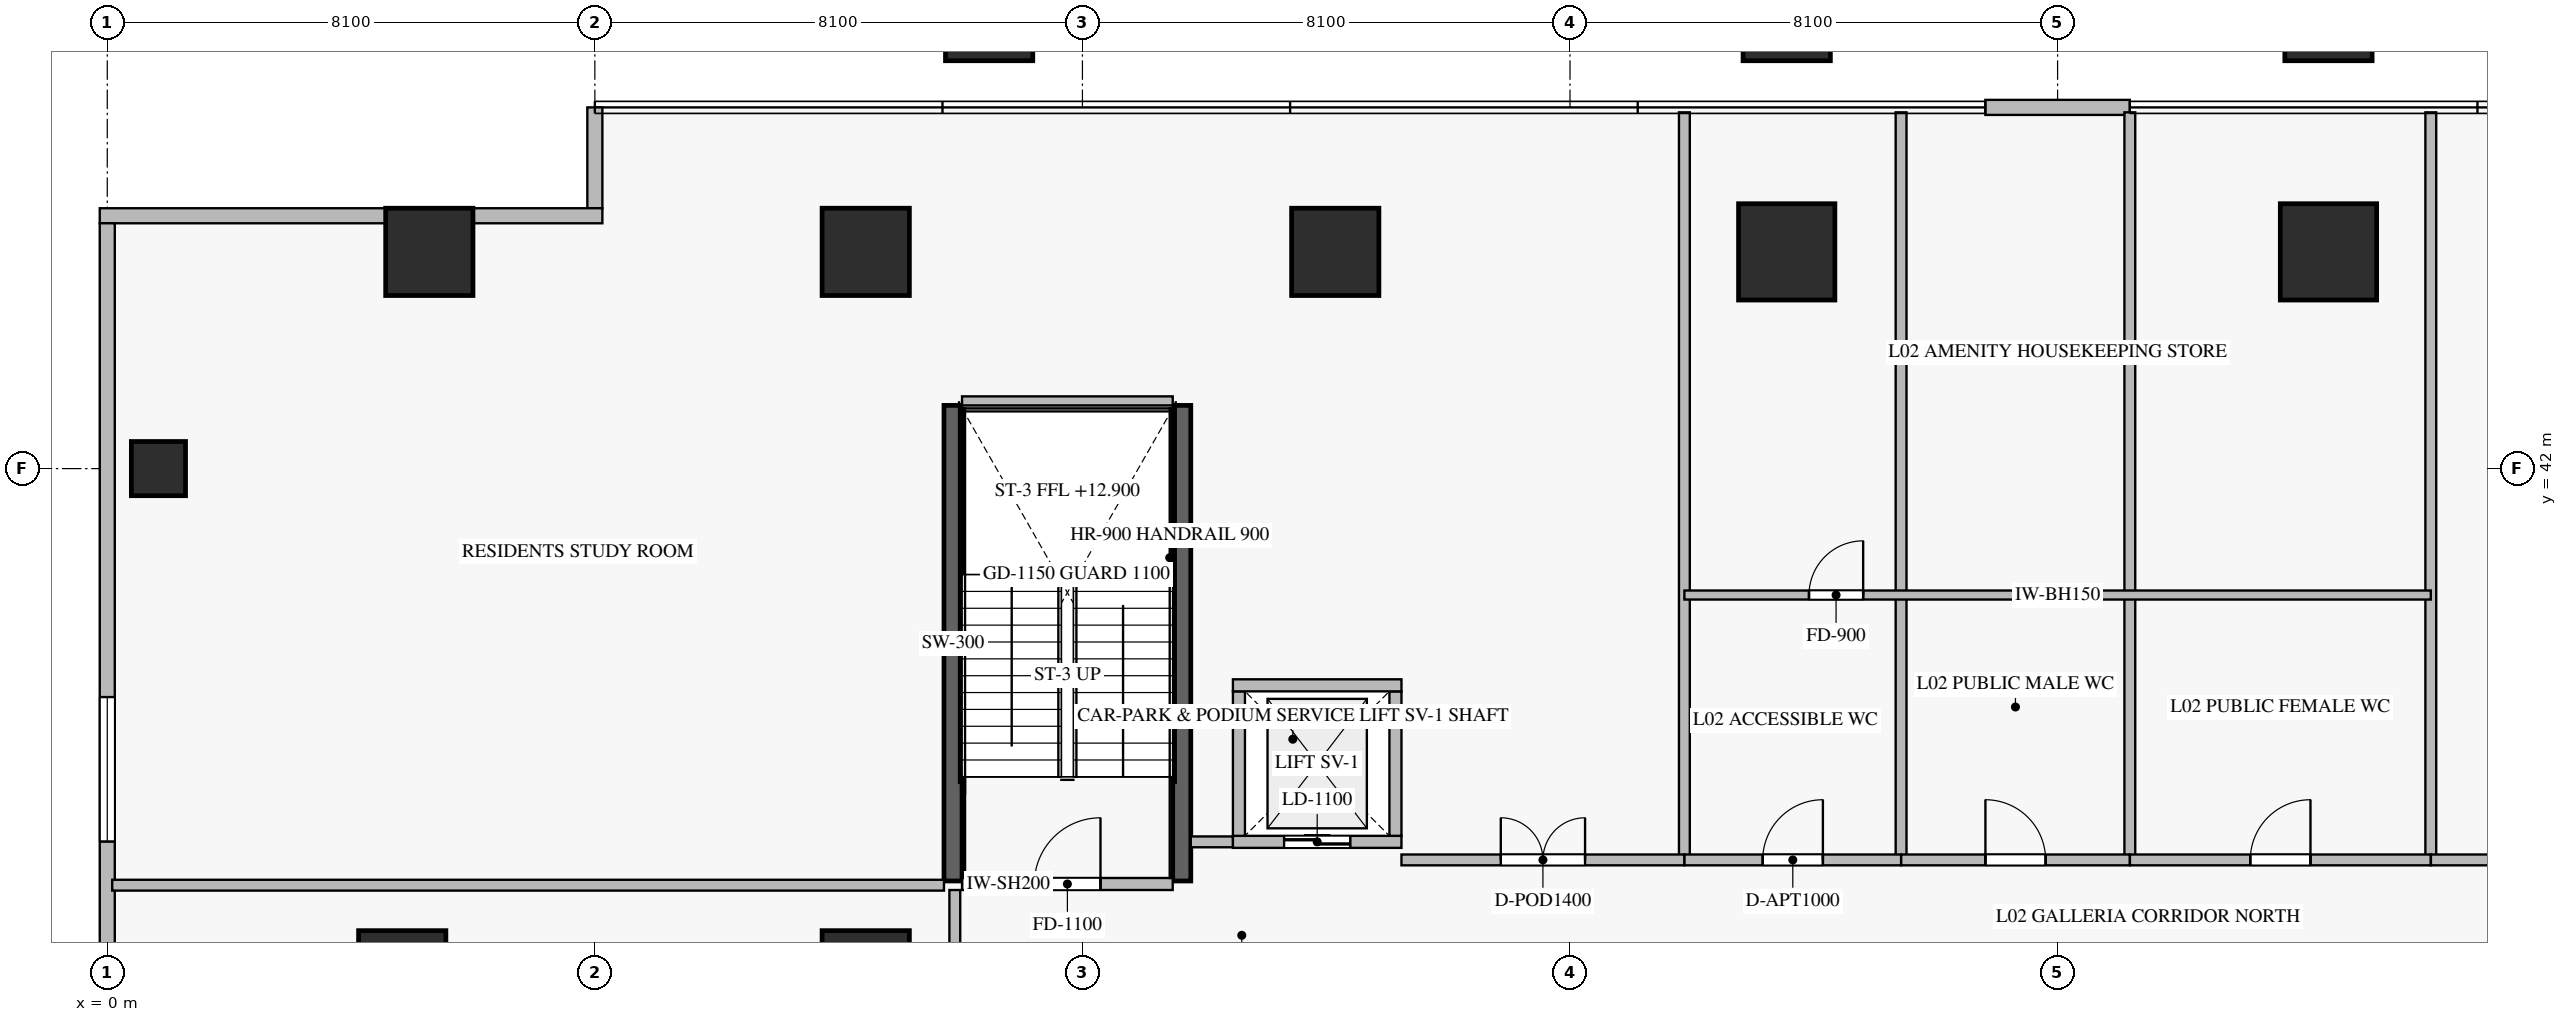
"""IFC4 building model, lengths in metres.
Left out: names, types, materials, properties, quantities, classifications, styles, units other than length and angle.
Written with IfcOpenShell. Run it as: python <this file> out.ifc"""

import sys

from ifc_helpers import new_model, si_unit, direction, frame, frame_2d, origin, origin_2d, place, context, subcontext, project, spatial, rectangle, extrude, source, transform, mapped, element, fill, save


model = new_model("IFC4")
c1 = context("Model", 3, precision=1e-05, world=origin(), true_north=direction((0.0, 1.0)))
c2 = subcontext(c1, "Body", "Model", "MODEL_VIEW")
j1 = project(units=[si_unit("LENGTHUNIT", "METRE"), si_unit("PLANEANGLEUNIT", "RADIAN")], contexts=[c1])
p1 = place(None, origin())
s1 = spatial("IfcSite", under=j1, at=p1, CompositionType="ELEMENT")
p2 = place(p1, origin())
s2 = spatial("IfcBuilding", under=s1, at=p2, CompositionType="ELEMENT")
p3 = place(p2, frame((0.0, 0.0, 10.5)))
s3 = spatial("IfcBuildingStorey", under=s2, at=p3, CompositionType="ELEMENT", Elevation=10.5)
m1 = source(origin(), c2, "Body", "SweptSolid", [
    extrude(rectangle(XDim=0.9, YDim=0.9, at=origin_2d()), origin(), (0.0, 0.0, 1.0), 4.8),
])
p4 = place(p3, frame((0.85, 42.0, -0.38), z_axis=(0.0, 0.0, 1.0), x_axis=(1.0, 0.0, 0.0)))
e1 = element("IfcColumn", 1, at=p4, inside=s3, PredefinedType="COLUMN", context=c2, shape_type="MappedRepresentation", body=[
    mapped(m1, transform((0.0, 0.0, 0.0), scale=1.0)),
])
m2 = source(origin(), c2, "Body", "SweptSolid", [
    extrude(rectangle(XDim=1.45, YDim=1.45, at=origin_2d()), origin(), (0.0, 0.0, 1.0), 4.8),
])
for number, where, z_axis, x_axis in (
    (2, (12.6, 45.6, -0.38), (0.0, 0.0, 1.0), (1.0, 0.0, 0.0)),
    (3, (20.4, 45.6, -0.38), (0.0, 0.0, 1.0), (1.0, 0.0, 0.0)),
):
    element("IfcColumn", number, at=place(p3, frame(where, z_axis=z_axis, x_axis=x_axis)), inside=s3, PredefinedType="COLUMN", context=c2, shape_type="MappedRepresentation", body=[
        mapped(m2, transform((0.0, 0.0, 0.0), scale=1.0)),
    ])
m3 = source(origin(), c2, "Body", "SweptSolid", [
    extrude(rectangle(XDim=1.6, YDim=1.6, at=origin_2d()), origin(), (0.0, 0.0, 1.0), 4.8),
])
for number, where, z_axis, x_axis in (
    (4, (27.9, 45.6, -0.38), (0.0, 0.0, 1.0), (1.0, 0.0, 0.0)),
    (5, (36.9, 45.6, -0.38), (0.0, 0.0, 1.0), (1.0, 0.0, 0.0)),
):
    element("IfcColumn", number, at=place(p3, frame(where, z_axis=z_axis, x_axis=x_axis)), inside=s3, PredefinedType="COLUMN", context=c2, shape_type="MappedRepresentation", body=[
        mapped(m3, transform((0.0, 0.0, 0.0), scale=1.0)),
    ])
for number, where, z_axis, x_axis in (
    (6, (12.6, 33.6, -0.38), (0.0, 0.0, 1.0), (1.0, 0.0, 0.0)),
    (7, (14.65, 49.5, -0.38), (0.0, 0.0, 1.0), (1.0, 0.0, 0.0)),
    (8, (27.9, 49.5, -0.38), (0.0, 0.0, 1.0), (1.0, 0.0, 0.0)),
    (9, (36.9, 49.5, -0.38), (0.0, 0.0, 1.0), (1.0, 0.0, 0.0)),
    (10, (4.9, 33.6, -0.38), (0.0, 0.0, 1.0), (1.0, 0.0, 0.0)),
    (11, (5.35, 45.6, -0.38), (0.0, 0.0, 1.0), (1.0, 0.0, 0.0)),
):
    element("IfcColumn", number, at=place(p3, frame(where, z_axis=z_axis, x_axis=x_axis)), inside=s3, PredefinedType="COLUMN", context=c2, shape_type="MappedRepresentation", body=[
        mapped(m2, transform((0.0, 0.0, 0.0), scale=1.0)),
    ])
p5 = place(p3, frame((33.6, 48.0, 0.0), z_axis=(0.0, 0.0, 1.0), x_axis=(-1.0, 0.0, 0.0)))
e12 = element("IfcWall", 12, at=p5, inside=s3, PredefinedType="ELEMENTEDWALL", context=c2, shape_type="SweptSolid", body=[
    extrude(rectangle(XDim=2.4, YDim=0.25, at=frame_2d((1.2, 0.0))), origin(), (0.0, 0.0, 1.0), 4.405),
])
p6 = place(p3, frame((8.1, 48.0, 0.0), z_axis=(0.0, 0.0, 1.0), x_axis=(0.0, -1.0, 0.0)))
e13 = element("IfcWall", 13, at=p6, inside=s3, PredefinedType="ELEMENTEDWALL", context=c2, shape_type="SweptSolid", body=[
    extrude(rectangle(XDim=1.675, YDim=0.25, at=frame_2d((0.837, 0.0))), origin(), (0.0, 0.0, 1.0), 4.405),
])
p7 = place(p3, frame((8.225, 46.2, 0.0), z_axis=(0.0, 0.0, 1.0), x_axis=(-1.0, 0.0, 0.0)))
e14 = element("IfcWall", 14, at=p7, inside=s3, PredefinedType="ELEMENTEDWALL", context=c2, shape_type="SweptSolid", body=[
    extrude(rectangle(XDim=8.35, YDim=0.25, at=frame_2d((4.175, 0.0))), origin(), (0.0, 0.0, 1.0), 4.405),
])
p8 = place(p3, frame((0.0, 46.075, 0.0), z_axis=(0.0, 0.0, 1.0), x_axis=(0.0, -1.0, 0.0)))
e15 = element("IfcWall", 15, at=p8, inside=s3, PredefinedType="ELEMENTEDWALL", context=c2, shape_type="SweptSolid", body=[
    extrude(rectangle(XDim=41.75, YDim=0.25, at=frame_2d((20.875, 0.0))), origin(), (0.0, 0.0, 1.0), 4.405),
])
p9 = place(p8, frame((7.87, 0.0, 0.6)))
e16 = element("IfcOpeningElement", 16, at=p9, cuts=e15, PredefinedType="OPENING", context=c2, shape_type="SweptSolid", body=[
    extrude(rectangle(XDim=2.4, YDim=2.6, at=frame_2d((1.2, 1.3))), frame((0.0, 0.135, 0.0), z_axis=(0.0, -1.0, 0.0), x_axis=(1.0, 0.0, 0.0)), (0.0, 0.0, 1.0), 0.27),
])
p10 = place(p8, frame((24.397, 0.0, 0.6)))
e17 = element("IfcOpeningElement", 17, at=p10, cuts=e15, PredefinedType="OPENING", context=c2, shape_type="SweptSolid", body=[
    extrude(rectangle(XDim=2.4, YDim=2.6, at=frame_2d((1.2, 1.3))), frame((0.0, 0.135, 0.0), z_axis=(0.0, -1.0, 0.0), x_axis=(1.0, 0.0, 0.0)), (0.0, 0.0, 1.0), 0.27),
])
for number, where, z_axis, x_axis in (
    (18, (14.05, 35.15, -0.38), (0.0, 0.0, 1.0), (0.0, 1.0, 0.0)),
    (19, (17.85, 35.15, -0.38), (0.0, 0.0, 1.0), (0.0, 1.0, 0.0)),
):
    element("IfcWall", number, at=place(p3, frame(where, z_axis=z_axis, x_axis=x_axis)), inside=s3, PredefinedType="SHEAR", context=c2, shape_type="SweptSolid", body=[
        extrude(rectangle(XDim=7.9, YDim=0.3, at=frame_2d((3.95, 0.0))), origin(), (0.0, 0.0, 1.0), 4.798),
    ])
p11 = place(p3, frame((14.2, 35.1, 0.0), z_axis=(0.0, 0.0, 1.0), x_axis=(1.0, 0.0, 0.0)))
e20 = element("IfcWall", 20, at=p11, inside=s3, PredefinedType="STANDARD", context=c2, shape_type="SweptSolid", body=[
    extrude(rectangle(XDim=3.5, YDim=0.2, at=frame_2d((1.75, 0.0))), origin(), (0.0, 0.0, 1.0), 4.42),
])
p12 = place(p11, frame((1.2, 0.0, 0.0)))
e21 = element("IfcOpeningElement", 21, at=p12, cuts=e20, PredefinedType="OPENING", context=c2, shape_type="SweptSolid", body=[
    extrude(rectangle(XDim=1.1, YDim=2.15, at=frame_2d((0.55, 1.075))), frame((0.0, 0.11, 0.0), z_axis=(0.0, -1.0, 0.0), x_axis=(1.0, 0.0, 0.0)), (0.0, 0.0, 1.0), 0.22),
])
p13 = place(p3, frame((14.2, 43.1, 0.0), z_axis=(0.0, 0.0, 1.0), x_axis=(1.0, 0.0, 0.0)))
e22 = element("IfcWall", 22, at=p13, inside=s3, PredefinedType="STANDARD", context=c2, shape_type="SweptSolid", body=[
    extrude(rectangle(XDim=3.5, YDim=0.2, at=frame_2d((1.75, 0.0))), origin(), (0.0, 0.0, 1.0), 1.885),
])
p14 = place(p3, frame((18.7, 35.8, 0.0), z_axis=(0.0, 0.0, 1.0), x_axis=(1.0, 0.0, 0.0)))
e23 = element("IfcWall", 23, at=p14, inside=s3, PredefinedType="STANDARD", context=c2, shape_type="SweptSolid", body=[
    extrude(rectangle(XDim=2.8, YDim=0.2, at=frame_2d((1.4, 0.0))), origin(), (0.0, 0.0, 1.0), 4.42),
])
p15 = place(p14, frame((0.85, 0.0, 0.0)))
e24 = element("IfcOpeningElement", 24, at=p15, cuts=e23, PredefinedType="OPENING", context=c2, shape_type="SweptSolid", body=[
    extrude(rectangle(XDim=1.1, YDim=2.2, at=frame_2d((0.55, 1.1))), frame((0.0, 0.11, 0.0), z_axis=(0.0, -1.0, 0.0), x_axis=(1.0, 0.0, 0.0)), (0.0, 0.0, 1.0), 0.22),
])
for number, where, z_axis, x_axis in (
    (25, (18.8, 35.9, 0.0), (0.0, 0.0, 1.0), (0.0, 1.0, 0.0)),
    (26, (21.4, 35.9, 0.0), (0.0, 0.0, 1.0), (0.0, 1.0, 0.0)),
):
    element("IfcWall", number, at=place(p3, frame(where, z_axis=z_axis, x_axis=x_axis)), inside=s3, PredefinedType="STANDARD", context=c2, shape_type="SweptSolid", body=[
        extrude(rectangle(XDim=2.4, YDim=0.2, at=frame_2d((1.2, 0.0))), origin(), (0.0, 0.0, 1.0), 4.42),
    ])
p16 = place(p3, frame((18.7, 38.4, 0.0), z_axis=(0.0, 0.0, 1.0), x_axis=(1.0, 0.0, 0.0)))
e27 = element("IfcWall", 27, at=p16, inside=s3, PredefinedType="STANDARD", context=c2, shape_type="SweptSolid", body=[
    extrude(rectangle(XDim=2.8, YDim=0.2, at=frame_2d((1.4, 0.0))), origin(), (0.0, 0.0, 1.0), 4.42),
])
p17 = place(p3, frame((0.082, 35.08, 0.0), z_axis=(0.0, 0.0, 1.0), x_axis=(1.0, 0.0, 0.0)))
e28 = element("IfcWall", 28, at=p17, inside=s3, PredefinedType="PARTITIONING", context=c2, shape_type="SweptSolid", body=[
    extrude(rectangle(XDim=13.818, YDim=0.18, at=frame_2d((6.909, 0.0))), origin(), (0.0, 0.0, 1.0), 4.42),
])
p18 = place(p3, frame((18.0, 35.8, 0.0), z_axis=(0.0, 0.0, 1.0), x_axis=(1.0, 0.0, 0.0)))
e29 = element("IfcWall", 29, at=p18, inside=s3, PredefinedType="PARTITIONING", context=c2, shape_type="SweptSolid", body=[
    extrude(rectangle(XDim=0.698, YDim=0.18, at=frame_2d((0.349, 0.0))), origin(), (0.0, 0.0, 1.0), 4.42),
])
p19 = place(p3, frame((14.08, 33.08, 0.0), z_axis=(0.0, 0.0, 1.0), x_axis=(0.0, 1.0, 0.0)))
e30 = element("IfcWall", 30, at=p19, inside=s3, PredefinedType="PARTITIONING", context=c2, shape_type="SweptSolid", body=[
    extrude(rectangle(XDim=1.92, YDim=0.18, at=frame_2d((0.96, 0.0))), origin(), (0.0, 0.0, 1.0), 4.42),
])
for number, where, z_axis, x_axis in (
    (31, (26.2, 35.5, 0.0), (0.0, 0.0, 1.0), (0.0, 1.0, 0.0)),
    (32, (29.8, 35.5, 0.0), (0.0, 0.0, 1.0), (0.0, 1.0, 0.0)),
    (33, (33.6, 35.5, 0.0), (0.0, 0.0, 1.0), (0.0, 1.0, 0.0)),
    (34, (38.6, 35.5, 0.0), (0.0, 0.0, 1.0), (0.0, 1.0, 0.0)),
):
    element("IfcWall", number, at=place(p3, frame(where, z_axis=z_axis, x_axis=x_axis)), inside=s3, PredefinedType="PARTITIONING", context=c2, shape_type="SweptSolid", body=[
        extrude(rectangle(XDim=12.418, YDim=0.18, at=frame_2d((6.209, 0.0))), origin(), (0.0, 0.0, 1.0), 4.42),
    ])
p20 = place(p3, frame((21.5, 35.5, 0.0), z_axis=(0.0, 0.0, 1.0), x_axis=(1.0, 0.0, 0.0)))
e35 = element("IfcWall", 35, at=p20, inside=s3, PredefinedType="PARTITIONING", context=c2, shape_type="SweptSolid", body=[
    extrude(rectangle(XDim=4.7, YDim=0.18, at=frame_2d((2.35, 0.0))), origin(), (0.0, 0.0, 1.0), 4.42),
])
p21 = place(p20, frame((1.65, 0.0, 0.0)))
e36 = element("IfcOpeningElement", 36, at=p21, cuts=e35, PredefinedType="OPENING", context=c2, shape_type="SweptSolid", body=[
    extrude(rectangle(XDim=1.4, YDim=2.25, at=frame_2d((0.7, 1.125))), frame((0.0, 0.1, 0.0), z_axis=(0.0, -1.0, 0.0), x_axis=(1.0, 0.0, 0.0)), (0.0, 0.0, 1.0), 0.2),
])
p22 = place(p3, frame((26.202, 35.5, 0.0), z_axis=(0.0, 0.0, 1.0), x_axis=(1.0, 0.0, 0.0)))
e37 = element("IfcWall", 37, at=p22, inside=s3, PredefinedType="PARTITIONING", context=c2, shape_type="SweptSolid", body=[
    extrude(rectangle(XDim=3.598, YDim=0.18, at=frame_2d((1.799, 0.0))), origin(), (0.0, 0.0, 1.0), 4.42),
])
p23 = place(p22, frame((1.299, 0.0, 0.0)))
e38 = element("IfcOpeningElement", 38, at=p23, cuts=e37, PredefinedType="OPENING", context=c2, shape_type="SweptSolid", body=[
    extrude(rectangle(XDim=1.0, YDim=2.15, at=frame_2d((0.5, 1.075))), frame((0.0, 0.1, 0.0), z_axis=(0.0, -1.0, 0.0), x_axis=(1.0, 0.0, 0.0)), (0.0, 0.0, 1.0), 0.2),
])
p24 = place(p3, frame((29.802, 35.5, 0.0), z_axis=(0.0, 0.0, 1.0), x_axis=(1.0, 0.0, 0.0)))
e39 = element("IfcWall", 39, at=p24, inside=s3, PredefinedType="PARTITIONING", context=c2, shape_type="SweptSolid", body=[
    extrude(rectangle(XDim=3.798, YDim=0.18, at=frame_2d((1.899, 0.0))), origin(), (0.0, 0.0, 1.0), 4.42),
])
p25 = place(p24, frame((1.399, 0.0, 0.0)))
e40 = element("IfcOpeningElement", 40, at=p25, cuts=e39, PredefinedType="OPENING", context=c2, shape_type="SweptSolid", body=[
    extrude(rectangle(XDim=1.0, YDim=2.15, at=frame_2d((0.5, 1.075))), frame((0.0, 0.1, 0.0), z_axis=(0.0, -1.0, 0.0), x_axis=(1.0, 0.0, 0.0)), (0.0, 0.0, 1.0), 0.2),
])
p26 = place(p3, frame((33.602, 35.5, 0.0), z_axis=(0.0, 0.0, 1.0), x_axis=(1.0, 0.0, 0.0)))
e41 = element("IfcWall", 41, at=p26, inside=s3, PredefinedType="PARTITIONING", context=c2, shape_type="SweptSolid", body=[
    extrude(rectangle(XDim=4.998, YDim=0.18, at=frame_2d((2.499, 0.0))), origin(), (0.0, 0.0, 1.0), 4.42),
])
p27 = place(p26, frame((1.999, 0.0, 0.0)))
e42 = element("IfcOpeningElement", 42, at=p27, cuts=e41, PredefinedType="OPENING", context=c2, shape_type="SweptSolid", body=[
    extrude(rectangle(XDim=1.0, YDim=2.15, at=frame_2d((0.5, 1.075))), frame((0.0, 0.1, 0.0), z_axis=(0.0, -1.0, 0.0), x_axis=(1.0, 0.0, 0.0)), (0.0, 0.0, 1.0), 0.2),
])
p28 = place(p3, frame((38.602, 35.5, 0.0), z_axis=(0.0, 0.0, 1.0), x_axis=(1.0, 0.0, 0.0)))
e43 = element("IfcWall", 43, at=p28, inside=s3, PredefinedType="PARTITIONING", context=c2, shape_type="SweptSolid", body=[
    extrude(rectangle(XDim=4.698, YDim=0.18, at=frame_2d((2.349, 0.0))), origin(), (0.0, 0.0, 1.0), 4.42),
])
p29 = place(p28, frame((1.649, 0.0, 0.0)))
e44 = element("IfcOpeningElement", 44, at=p29, cuts=e43, PredefinedType="OPENING", context=c2, shape_type="SweptSolid", body=[
    extrude(rectangle(XDim=1.4, YDim=2.25, at=frame_2d((0.7, 1.125))), frame((0.0, 0.1, 0.0), z_axis=(0.0, -1.0, 0.0), x_axis=(1.0, 0.0, 0.0)), (0.0, 0.0, 1.0), 0.2),
])
p30 = place(p3, frame((26.2, 39.9, 0.0), z_axis=(0.0, 0.0, 1.0), x_axis=(1.0, 0.0, 0.0)))
e45 = element("IfcWall", 45, at=p30, inside=s3, PredefinedType="PARTITIONING", context=c2, shape_type="SweptSolid", body=[
    extrude(rectangle(XDim=12.4, YDim=0.15, at=frame_2d((6.2, 0.0))), origin(), (0.0, 0.0, 1.0), 4.42),
])
p31 = place(p30, frame((2.07, 0.0, 0.0)))
e46 = element("IfcOpeningElement", 46, at=p31, cuts=e45, PredefinedType="OPENING", context=c2, shape_type="SweptSolid", body=[
    extrude(rectangle(XDim=0.9, YDim=2.1, at=frame_2d((0.45, 1.05))), frame((0.0, 0.085, 0.0), z_axis=(0.0, -1.0, 0.0), x_axis=(1.0, 0.0, 0.0)), (0.0, 0.0, 1.0), 0.17),
])
m4 = source(origin(), c2, "Body", "SweptSolid", [
    extrude(rectangle(XDim=2.4, YDim=2.6, at=frame_2d((1.2, 1.3))), frame((0.0, 0.03, 0.0), z_axis=(0.0, -1.0, 0.0), x_axis=(1.0, 0.0, 0.0)), (0.0, 0.0, 1.0), 0.06),
])
p32 = place(p9, origin())
e47 = element("IfcWindow", 47, at=p32, inside=s3, PartitioningType="SINGLE_PANEL", PredefinedType="WINDOW", context=c2, shape_type="MappedRepresentation", body=[
    mapped(m4, transform((0.0, 0.0, 0.0), scale=1.0)),
])
fill(e16, e47)
m5 = source(origin(), c2, "Body", "SweptSolid", [
    extrude(rectangle(XDim=1.1, YDim=2.15, at=frame_2d((0.55, 1.075))), frame((0.0, 0.025, 0.0), z_axis=(0.0, -1.0, 0.0), x_axis=(1.0, 0.0, 0.0)), (0.0, 0.0, 1.0), 0.05),
])
p33 = place(p12, origin())
e48 = element("IfcDoor", 48, at=p33, inside=s3, OperationType="SINGLE_SWING_RIGHT", PredefinedType="DOOR", context=c2, shape_type="MappedRepresentation", body=[
    mapped(m5, transform((0.0, 0.0, 0.0), scale=1.0)),
])
fill(e21, e48)
m6 = source(origin(), c2, "Body", "SweptSolid", [
    extrude(rectangle(XDim=1.1, YDim=2.2, at=frame_2d((0.55, 1.1))), frame((0.0, 0.025, 0.0), z_axis=(0.0, -1.0, 0.0), x_axis=(1.0, 0.0, 0.0)), (0.0, 0.0, 1.0), 0.05),
])
p34 = place(p15, origin())
e49 = element("IfcDoor", 49, at=p34, inside=s3, OperationType="DOUBLE_DOOR_SLIDING", PredefinedType="DOOR", context=c2, shape_type="MappedRepresentation", body=[
    mapped(m6, transform((0.0, 0.0, 0.0), scale=1.0)),
])
fill(e24, e49)
m7 = source(origin(), c2, "Body", "SweptSolid", [
    extrude(rectangle(XDim=1.4, YDim=2.25, at=frame_2d((0.7, 1.125))), frame((0.0, 0.025, 0.0), z_axis=(0.0, -1.0, 0.0), x_axis=(1.0, 0.0, 0.0)), (0.0, 0.0, 1.0), 0.05),
])
p35 = place(p21, origin())
e50 = element("IfcDoor", 50, at=p35, inside=s3, OperationType="DOUBLE_DOOR_SINGLE_SWING", PredefinedType="DOOR", context=c2, shape_type="MappedRepresentation", body=[
    mapped(m7, transform((0.0, 0.0, 0.0), scale=1.0)),
])
fill(e36, e50)
m8 = source(origin(), c2, "Body", "SweptSolid", [
    extrude(rectangle(XDim=1.0, YDim=2.15, at=frame_2d((0.5, 1.075))), frame((0.0, 0.025, 0.0), z_axis=(0.0, -1.0, 0.0), x_axis=(1.0, 0.0, 0.0)), (0.0, 0.0, 1.0), 0.05),
])
p36 = place(p23, origin())
e51 = element("IfcDoor", 51, at=p36, inside=s3, OperationType="SINGLE_SWING_RIGHT", PredefinedType="DOOR", context=c2, shape_type="MappedRepresentation", body=[
    mapped(m8, transform((0.0, 0.0, 0.0), scale=1.0)),
])
fill(e38, e51)
p37 = place(p25, origin())
e52 = element("IfcDoor", 52, at=p37, inside=s3, OperationType="SINGLE_SWING_LEFT", PredefinedType="DOOR", context=c2, shape_type="MappedRepresentation", body=[
    mapped(m8, transform((0.0, 0.0, 0.0), scale=1.0)),
])
fill(e40, e52)
p38 = place(p27, origin())
e53 = element("IfcDoor", 53, at=p38, inside=s3, OperationType="SINGLE_SWING_RIGHT", PredefinedType="DOOR", context=c2, shape_type="MappedRepresentation", body=[
    mapped(m8, transform((0.0, 0.0, 0.0), scale=1.0)),
])
fill(e42, e53)
m9 = source(origin(), c2, "Body", "SweptSolid", [
    extrude(rectangle(XDim=0.9, YDim=2.1, at=frame_2d((0.45, 1.05))), frame((0.0, 0.025, 0.0), z_axis=(0.0, -1.0, 0.0), x_axis=(1.0, 0.0, 0.0)), (0.0, 0.0, 1.0), 0.05),
])
p39 = place(p31, origin())
e54 = element("IfcDoor", 54, at=p39, inside=s3, OperationType="SINGLE_SWING_RIGHT", PredefinedType="DOOR", context=c2, shape_type="MappedRepresentation", body=[
    mapped(m9, transform((0.0, 0.0, 0.0), scale=1.0)),
])
fill(e46, e54)
save(model, sys.argv[1])
